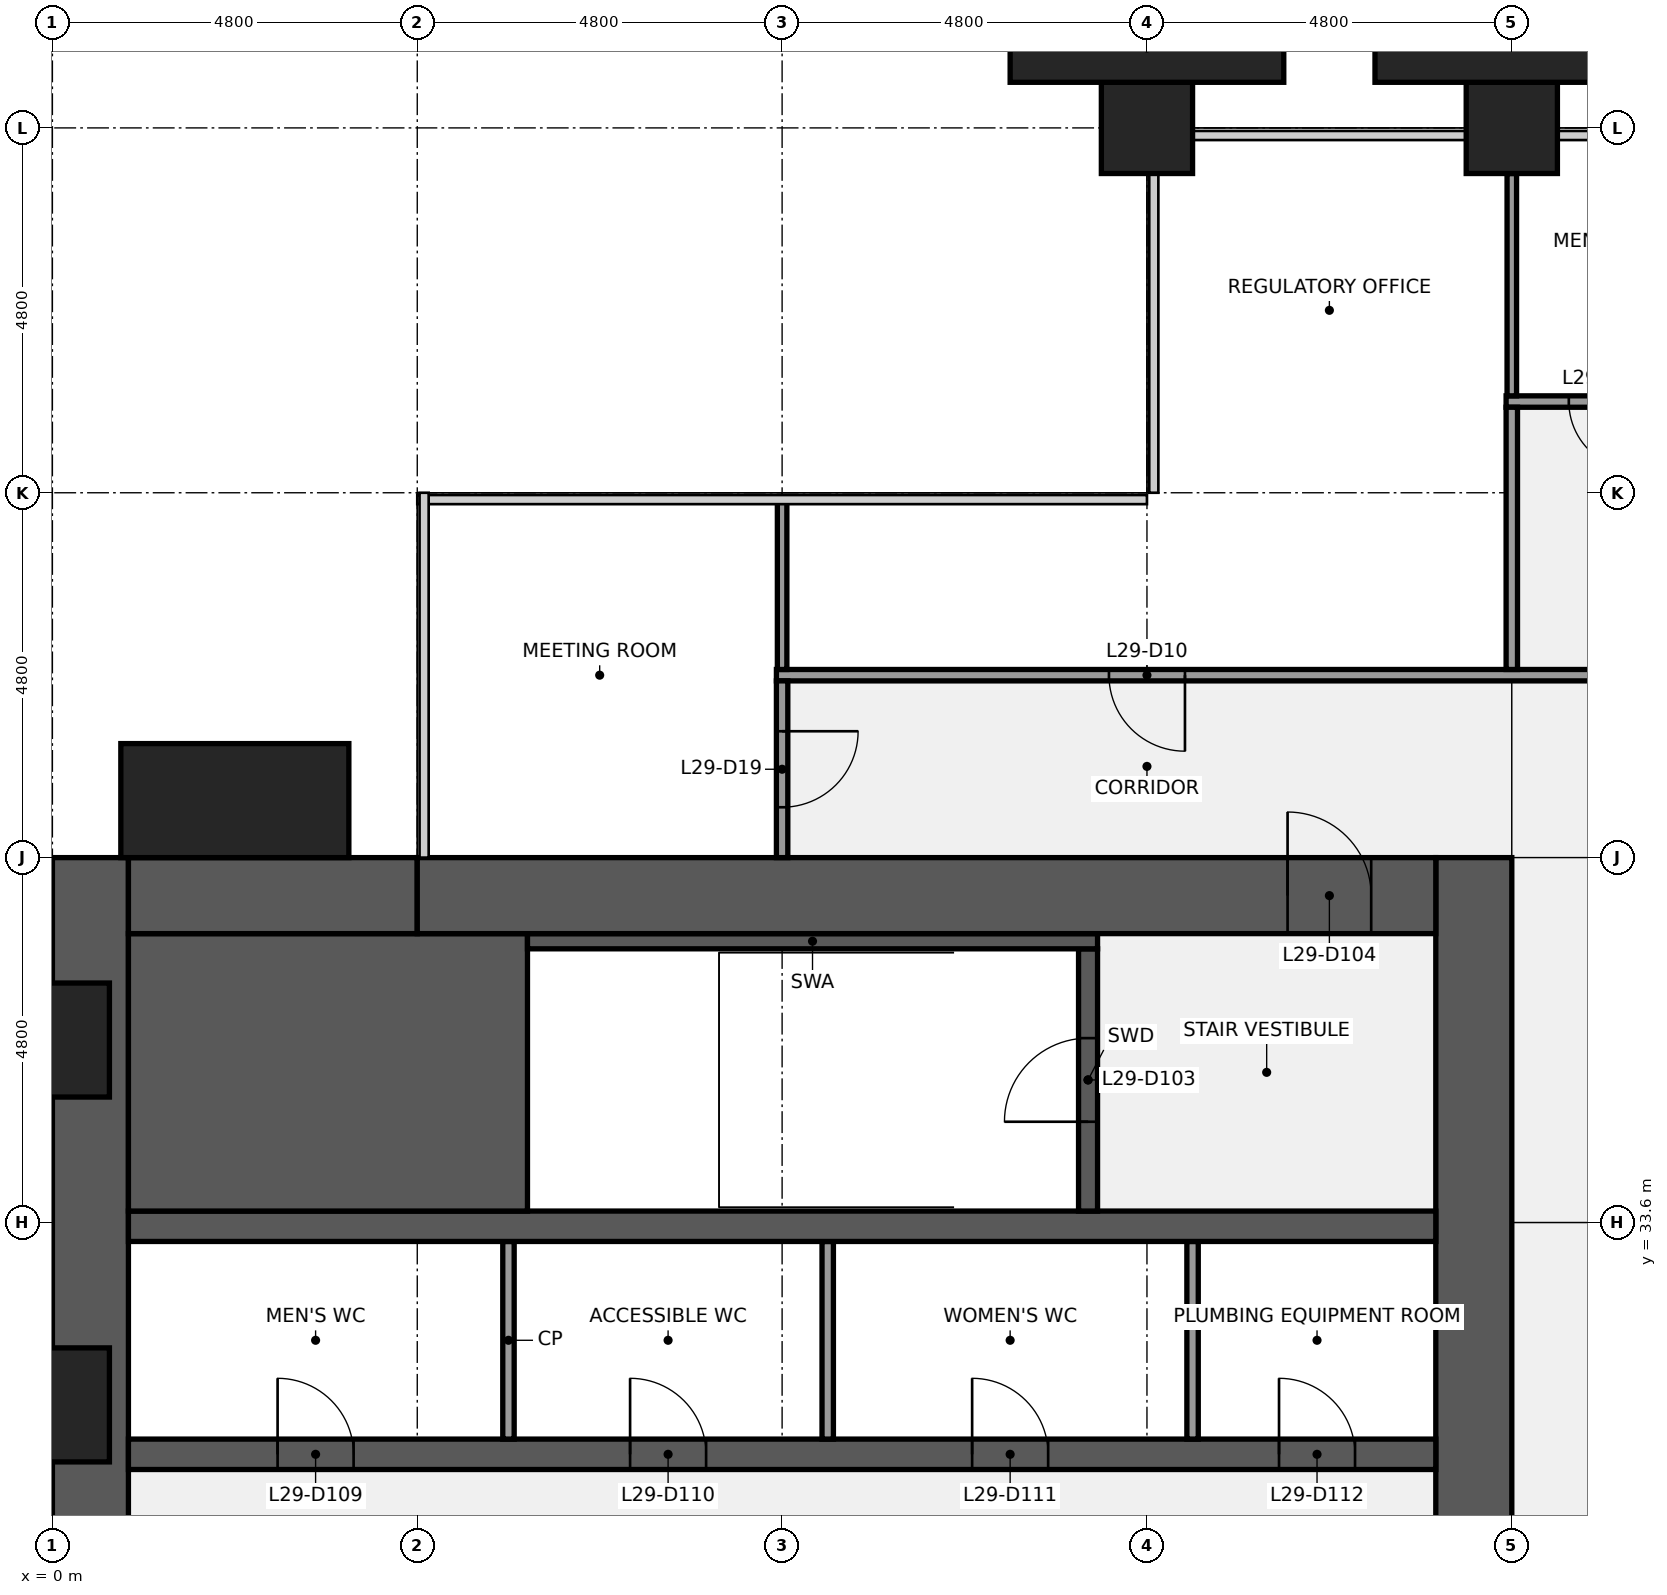
"""IFC4 building model, lengths in metres.
Left out: names, types, materials, properties, quantities, classifications, styles, units other than length and angle.
Written with IfcOpenShell. Run it as: python <this file> out.ifc"""

import sys

from ifc_helpers import new_model, si_unit, direction, frame, frame_2d, origin, origin_2d, place, context, subcontext, project, spatial, rectangle, extrude, element, fill, save


model = new_model("IFC4")
c1 = context("Model", 3, precision=1e-05, world=origin(), true_north=direction((0.0, 1.0)))
c2 = subcontext(c1, "Body", "Model", "MODEL_VIEW")
j1 = project(units=[si_unit("LENGTHUNIT", "METRE"), si_unit("PLANEANGLEUNIT", "RADIAN")], contexts=[c1])
p1 = place(None, origin())
s1 = spatial("IfcSite", under=j1, at=p1, CompositionType="ELEMENT")
p2 = place(p1, origin())
s2 = spatial("IfcBuilding", under=s1, at=p2, CompositionType="ELEMENT")
p3 = place(p2, frame((0.0, 0.0, 136.1)))
s3 = spatial("IfcBuildingStorey", under=s2, at=p3, CompositionType="ELEMENT", Elevation=136.1)
for number, where, z_axis, x_axis in (
    (1, (14.4, 48.0, 0.0), (0.0, 0.0, 1.0), (1.0, 0.0, 0.0)),
    (2, (19.2, 48.0, 0.0), (0.0, 0.0, 1.0), (1.0, 0.0, 0.0)),
):
    element("IfcColumn", number, at=place(p3, frame(where, z_axis=z_axis, x_axis=x_axis)), inside=s3, PredefinedType="COLUMN", context=c2, shape_type="SweptSolid", body=[
        extrude(rectangle(XDim=1.2, YDim=1.2, at=origin_2d()), origin(), (0.0, 0.0, 1.0), 4.0),
    ])
p4 = place(p3, frame((0.5, 9.6, 0.0), z_axis=(0.0, 0.0, 1.0), x_axis=(0.0, 1.0, 0.0)))
e3 = element("IfcWall", 3, at=p4, inside=s3, PredefinedType="SHEAR", context=c2, shape_type="SweptSolid", body=[
    extrude(rectangle(XDim=28.8, YDim=1.0, at=frame_2d((14.4, 0.0))), origin(), (0.0, 0.0, 1.0), 3.84),
])
p5 = place(p4, frame((8.85, 0.0, 0.9)))
e4 = element("IfcOpeningElement", 4, at=p5, cuts=e3, PredefinedType="OPENING", context=c2, shape_type="SweptSolid", body=[
    extrude(rectangle(XDim=1.5, YDim=1.5, at=frame_2d((0.75, 0.75))), frame((0.0, 0.51, 0.0), z_axis=(0.0, -1.0, 0.0), x_axis=(1.0, 0.0, 0.0)), (0.0, 0.0, 1.0), 1.02),
])
p6 = place(p4, frame((18.45, 0.0, 0.9)))
e5 = element("IfcOpeningElement", 5, at=p6, cuts=e3, PredefinedType="OPENING", context=c2, shape_type="SweptSolid", body=[
    extrude(rectangle(XDim=1.5, YDim=1.5, at=frame_2d((0.75, 0.75))), frame((0.0, 0.51, 0.0), z_axis=(0.0, -1.0, 0.0), x_axis=(1.0, 0.0, 0.0)), (0.0, 0.0, 1.0), 1.02),
])
p7 = place(p3, frame((18.7, 38.4, 0.0), z_axis=(0.0, 0.0, 1.0), x_axis=(0.0, -1.0, 0.0)))
e6 = element("IfcWall", 6, at=p7, inside=s3, PredefinedType="SHEAR", context=c2, shape_type="SweptSolid", body=[
    extrude(rectangle(XDim=28.8, YDim=1.0, at=frame_2d((14.4, 0.0))), origin(), (0.0, 0.0, 1.0), 3.84),
])
p8 = place(p7, frame((18.3, 0.0, 0.0)))
e7 = element("IfcOpeningElement", 7, at=p8, cuts=e6, PredefinedType="OPENING", context=c2, shape_type="SweptSolid", body=[
    extrude(rectangle(XDim=1.8, YDim=2.1, at=frame_2d((0.9, 1.05))), frame((0.0, 0.51, 0.0), z_axis=(0.0, -1.0, 0.0), x_axis=(1.0, 0.0, 0.0)), (0.0, 0.0, 1.0), 1.02),
])
p9 = place(p7, frame((8.7, 0.0, 0.0)))
e8 = element("IfcOpeningElement", 8, at=p9, cuts=e6, PredefinedType="OPENING", context=c2, shape_type="SweptSolid", body=[
    extrude(rectangle(XDim=1.8, YDim=2.1, at=frame_2d((0.9, 1.05))), frame((0.0, 0.51, 0.0), z_axis=(0.0, -1.0, 0.0), x_axis=(1.0, 0.0, 0.0)), (0.0, 0.0, 1.0), 1.02),
])
p10 = place(p3, frame((1.0, 30.55, 0.0), z_axis=(0.0, 0.0, 1.0), x_axis=(1.0, 0.0, 0.0)))
e9 = element("IfcWall", 9, at=p10, inside=s3, PredefinedType="SHEAR", context=c2, shape_type="SweptSolid", body=[
    extrude(rectangle(XDim=17.2, YDim=0.4, at=frame_2d((8.6, 0.0))), origin(), (0.0, 0.0, 1.0), 3.84),
])
p11 = place(p10, frame((1.962, 0.0, 0.0)))
e10 = element("IfcOpeningElement", 10, at=p11, cuts=e9, PredefinedType="OPENING", context=c2, shape_type="SweptSolid", body=[
    extrude(rectangle(XDim=1.0, YDim=2.1, at=frame_2d((0.5, 1.05))), frame((0.0, 0.21, 0.0), z_axis=(0.0, -1.0, 0.0), x_axis=(1.0, 0.0, 0.0)), (0.0, 0.0, 1.0), 0.42),
])
p12 = place(p10, frame((6.6, 0.0, 0.0)))
e11 = element("IfcOpeningElement", 11, at=p12, cuts=e9, PredefinedType="OPENING", context=c2, shape_type="SweptSolid", body=[
    extrude(rectangle(XDim=1.0, YDim=2.1, at=frame_2d((0.5, 1.05))), frame((0.0, 0.21, 0.0), z_axis=(0.0, -1.0, 0.0), x_axis=(1.0, 0.0, 0.0)), (0.0, 0.0, 1.0), 0.42),
])
p13 = place(p10, frame((11.1, 0.0, 0.0)))
e12 = element("IfcOpeningElement", 12, at=p13, cuts=e9, PredefinedType="OPENING", context=c2, shape_type="SweptSolid", body=[
    extrude(rectangle(XDim=1.0, YDim=2.1, at=frame_2d((0.5, 1.05))), frame((0.0, 0.21, 0.0), z_axis=(0.0, -1.0, 0.0), x_axis=(1.0, 0.0, 0.0)), (0.0, 0.0, 1.0), 0.42),
])
p14 = place(p10, frame((15.137, 0.0, 0.0)))
e13 = element("IfcOpeningElement", 13, at=p14, cuts=e9, PredefinedType="OPENING", context=c2, shape_type="SweptSolid", body=[
    extrude(rectangle(XDim=1.0, YDim=2.1, at=frame_2d((0.5, 1.05))), frame((0.0, 0.21, 0.0), z_axis=(0.0, -1.0, 0.0), x_axis=(1.0, 0.0, 0.0)), (0.0, 0.0, 1.0), 0.42),
])
for number, where, z_axis, x_axis in (
    (14, (6.0, 30.75, 0.0), (0.0, 0.0, 1.0), (0.0, 1.0, 0.0)),
    (15, (10.2, 30.75, 0.0), (0.0, 0.0, 1.0), (0.0, 1.0, 0.0)),
    (16, (15.0, 30.75, 0.0), (0.0, 0.0, 1.0), (0.0, 1.0, 0.0)),
):
    element("IfcWall", number, at=place(p3, frame(where, z_axis=z_axis, x_axis=x_axis)), inside=s3, PredefinedType="PARTITIONING", context=c2, shape_type="SweptSolid", body=[
        extrude(rectangle(XDim=2.6, YDim=0.15, at=frame_2d((1.3, 0.0))), origin(), (0.0, 0.0, 1.0), 3.84),
    ])
p15 = place(p3, frame((1.0, 33.55, 0.0), z_axis=(0.0, 0.0, 1.0), x_axis=(1.0, 0.0, 0.0)))
e17 = element("IfcWall", 17, at=p15, inside=s3, PredefinedType="SHEAR", context=c2, shape_type="SweptSolid", body=[
    extrude(rectangle(XDim=17.2, YDim=0.4, at=frame_2d((8.6, 0.0))), origin(), (0.0, 0.0, 1.0), 3.84),
])
p16 = place(p3, frame((1.0, 35.575, 0.0), z_axis=(0.0, 0.0, 1.0), x_axis=(1.0, 0.0, 0.0)))
e18 = element("IfcWall", 18, at=p16, inside=s3, PredefinedType="SHEAR", context=c2, shape_type="SweptSolid", body=[
    extrude(rectangle(XDim=5.25, YDim=3.65, at=frame_2d((2.625, 0.0))), origin(), (0.0, 0.0, 1.0), 3.84),
])
p17 = place(p3, frame((13.625, 33.75, 0.0), z_axis=(0.0, 0.0, 1.0), x_axis=(0.0, 1.0, 0.0)))
e19 = element("IfcWall", 19, at=p17, inside=s3, PredefinedType="SHEAR", context=c2, shape_type="SweptSolid", body=[
    extrude(rectangle(XDim=3.45, YDim=0.25, at=frame_2d((1.725, 0.0))), origin(), (0.0, 0.0, 1.0), 3.84),
])
p18 = place(p17, frame((1.175, 0.0, 0.0)))
e20 = element("IfcOpeningElement", 20, at=p18, cuts=e19, PredefinedType="OPENING", context=c2, shape_type="SweptSolid", body=[
    extrude(rectangle(XDim=1.1, YDim=2.1, at=frame_2d((0.55, 1.05))), frame((0.0, 0.135, 0.0), z_axis=(0.0, -1.0, 0.0), x_axis=(1.0, 0.0, 0.0)), (0.0, 0.0, 1.0), 0.27),
])
p19 = place(p3, frame((6.25, 37.3, 0.0), z_axis=(0.0, 0.0, 1.0), x_axis=(1.0, 0.0, 0.0)))
e21 = element("IfcWall", 21, at=p19, inside=s3, PredefinedType="SHEAR", context=c2, shape_type="SweptSolid", body=[
    extrude(rectangle(XDim=7.5, YDim=0.2, at=frame_2d((3.75, 0.0))), origin(), (0.0, 0.0, 1.0), 3.84),
])
p20 = place(p3, frame((1.0, 37.9, 0.0), z_axis=(0.0, 0.0, 1.0), x_axis=(1.0, 0.0, 0.0)))
e22 = element("IfcWall", 22, at=p20, inside=s3, PredefinedType="SHEAR", context=c2, shape_type="SweptSolid", body=[
    extrude(rectangle(XDim=3.8, YDim=1.0, at=frame_2d((1.9, 0.0))), origin(), (0.0, 0.0, 1.0), 3.84),
])
p21 = place(p3, frame((4.8, 37.9, 0.0), z_axis=(0.0, 0.0, 1.0), x_axis=(1.0, 0.0, 0.0)))
e23 = element("IfcWall", 23, at=p21, inside=s3, PredefinedType="SHEAR", context=c2, shape_type="SweptSolid", body=[
    extrude(rectangle(XDim=13.4, YDim=1.0, at=frame_2d((6.7, 0.0))), origin(), (0.0, 0.0, 1.0), 3.84),
])
p22 = place(p21, frame((11.45, 0.0, 0.0)))
e24 = element("IfcOpeningElement", 24, at=p22, cuts=e23, PredefinedType="OPENING", context=c2, shape_type="SweptSolid", body=[
    extrude(rectangle(XDim=1.1, YDim=2.1, at=frame_2d((0.55, 1.05))), frame((0.0, 0.51, 0.0), z_axis=(0.0, -1.0, 0.0), x_axis=(1.0, 0.0, 0.0)), (0.0, 0.0, 1.0), 1.02),
])
p23 = place(p3, frame((9.525, 40.8, 0.0), z_axis=(0.0, 0.0, 1.0), x_axis=(1.0, 0.0, 0.0)))
e25 = element("IfcWall", 25, at=p23, inside=s3, PredefinedType="PARTITIONING", context=c2, shape_type="SweptSolid", body=[
    extrude(rectangle(XDim=38.55, YDim=0.15, at=frame_2d((19.275, 0.0))), origin(), (0.0, 0.0, 1.0), 2.849),
])
p24 = place(p23, frame((4.375, 0.0, 0.0)))
e26 = element("IfcOpeningElement", 26, at=p24, cuts=e25, PredefinedType="OPENING", context=c2, shape_type="SweptSolid", body=[
    extrude(rectangle(XDim=1.0, YDim=2.1, at=frame_2d((0.5, 1.05))), frame((0.0, 0.085, 0.0), z_axis=(0.0, -1.0, 0.0), x_axis=(1.0, 0.0, 0.0)), (0.0, 0.0, 1.0), 0.17),
])
p25 = place(p23, frame((12.775, 0.0, 0.0)))
e27 = element("IfcOpeningElement", 27, at=p25, cuts=e25, PredefinedType="OPENING", context=c2, shape_type="SweptSolid", body=[
    extrude(rectangle(XDim=1.0, YDim=2.1, at=frame_2d((0.5, 1.05))), frame((0.0, 0.085, 0.0), z_axis=(0.0, -1.0, 0.0), x_axis=(1.0, 0.0, 0.0)), (0.0, 0.0, 1.0), 0.17),
])
p26 = place(p23, frame((17.575, 0.0, 0.0)))
e28 = element("IfcOpeningElement", 28, at=p26, cuts=e25, PredefinedType="OPENING", context=c2, shape_type="SweptSolid", body=[
    extrude(rectangle(XDim=1.0, YDim=2.1, at=frame_2d((0.5, 1.05))), frame((0.0, 0.085, 0.0), z_axis=(0.0, -1.0, 0.0), x_axis=(1.0, 0.0, 0.0)), (0.0, 0.0, 1.0), 0.17),
])
p27 = place(p23, frame((21.175, 0.0, 0.0)))
e29 = element("IfcOpeningElement", 29, at=p27, cuts=e25, PredefinedType="OPENING", context=c2, shape_type="SweptSolid", body=[
    extrude(rectangle(XDim=1.0, YDim=2.1, at=frame_2d((0.5, 1.05))), frame((0.0, 0.085, 0.0), z_axis=(0.0, -1.0, 0.0), x_axis=(1.0, 0.0, 0.0)), (0.0, 0.0, 1.0), 0.17),
])
p28 = place(p23, frame((25.975, 0.0, 0.0)))
e30 = element("IfcOpeningElement", 30, at=p28, cuts=e25, PredefinedType="OPENING", context=c2, shape_type="SweptSolid", body=[
    extrude(rectangle(XDim=1.0, YDim=2.1, at=frame_2d((0.5, 1.05))), frame((0.0, 0.085, 0.0), z_axis=(0.0, -1.0, 0.0), x_axis=(1.0, 0.0, 0.0)), (0.0, 0.0, 1.0), 0.17),
])
p29 = place(p23, frame((33.175, 0.0, 0.0)))
e31 = element("IfcOpeningElement", 31, at=p29, cuts=e25, PredefinedType="OPENING", context=c2, shape_type="SweptSolid", body=[
    extrude(rectangle(XDim=1.0, YDim=2.1, at=frame_2d((0.5, 1.05))), frame((0.0, 0.085, 0.0), z_axis=(0.0, -1.0, 0.0), x_axis=(1.0, 0.0, 0.0)), (0.0, 0.0, 1.0), 0.17),
])
p30 = place(p3, frame((19.125, 44.4, 0.0), z_axis=(0.0, 0.0, 1.0), x_axis=(1.0, 0.0, 0.0)))
e32 = element("IfcWall", 32, at=p30, inside=s3, PredefinedType="PARTITIONING", context=c2, shape_type="SweptSolid", body=[
    extrude(rectangle(XDim=7.35, YDim=0.15, at=frame_2d((3.675, 0.0))), origin(), (0.0, 0.0, 1.0), 2.849),
])
p31 = place(p30, frame((0.825, 0.0, 0.0)))
e33 = element("IfcOpeningElement", 33, at=p31, cuts=e32, PredefinedType="OPENING", context=c2, shape_type="SweptSolid", body=[
    extrude(rectangle(XDim=0.9, YDim=2.1, at=frame_2d((0.45, 1.05))), frame((0.0, 0.085, 0.0), z_axis=(0.0, -1.0, 0.0), x_axis=(1.0, 0.0, 0.0)), (0.0, 0.0, 1.0), 0.17),
])
p32 = place(p30, frame((3.225, 0.0, 0.0)))
e34 = element("IfcOpeningElement", 34, at=p32, cuts=e32, PredefinedType="OPENING", context=c2, shape_type="SweptSolid", body=[
    extrude(rectangle(XDim=0.9, YDim=2.1, at=frame_2d((0.45, 1.05))), frame((0.0, 0.085, 0.0), z_axis=(0.0, -1.0, 0.0), x_axis=(1.0, 0.0, 0.0)), (0.0, 0.0, 1.0), 0.17),
])
p33 = place(p30, frame((5.475, 0.0, 0.0)))
e35 = element("IfcOpeningElement", 35, at=p33, cuts=e32, PredefinedType="OPENING", context=c2, shape_type="SweptSolid", body=[
    extrude(rectangle(XDim=1.2, YDim=2.1, at=frame_2d((0.6, 1.05))), frame((0.0, 0.085, 0.0), z_axis=(0.0, -1.0, 0.0), x_axis=(1.0, 0.0, 0.0)), (0.0, 0.0, 1.0), 0.17),
])
p34 = place(p3, frame((9.6, 40.875, 0.0), z_axis=(0.0, 0.0, 1.0), x_axis=(0.0, 1.0, 0.0)))
e36 = element("IfcWall", 36, at=p34, inside=s3, PredefinedType="PARTITIONING", context=c2, shape_type="SweptSolid", body=[
    extrude(rectangle(XDim=2.225, YDim=0.125, at=frame_2d((1.113, 0.0))), origin(), (0.0, 0.0, 1.0), 2.849),
])
p35 = place(p3, frame((9.6, 38.4, 0.0), z_axis=(0.0, 0.0, 1.0), x_axis=(0.0, 1.0, 0.0)))
e37 = element("IfcWall", 37, at=p35, inside=s3, PredefinedType="PARTITIONING", context=c2, shape_type="SweptSolid", body=[
    extrude(rectangle(XDim=2.325, YDim=0.15, at=frame_2d((1.163, 0.0))), origin(), (0.0, 0.0, 1.0), 2.849),
])
p36 = place(p35, frame((0.663, 0.0, 0.0)))
e38 = element("IfcOpeningElement", 38, at=p36, cuts=e37, PredefinedType="OPENING", context=c2, shape_type="SweptSolid", body=[
    extrude(rectangle(XDim=1.0, YDim=2.1, at=frame_2d((0.5, 1.05))), frame((0.0, 0.085, 0.0), z_axis=(0.0, -1.0, 0.0), x_axis=(1.0, 0.0, 0.0)), (0.0, 0.0, 1.0), 0.17),
])
p37 = place(p3, frame((19.2, 44.475, 0.0), z_axis=(0.0, 0.0, 1.0), x_axis=(0.0, 1.0, 0.0)))
e39 = element("IfcWall", 39, at=p37, inside=s3, PredefinedType="PARTITIONING", context=c2, shape_type="SweptSolid", body=[
    extrude(rectangle(XDim=2.925, YDim=0.125, at=frame_2d((1.462, 0.0))), origin(), (0.0, 0.0, 1.0), 2.849),
])
p38 = place(p3, frame((19.2, 40.875, 0.0), z_axis=(0.0, 0.0, 1.0), x_axis=(0.0, 1.0, 0.0)))
e40 = element("IfcWall", 40, at=p38, inside=s3, PredefinedType="PARTITIONING", context=c2, shape_type="SweptSolid", body=[
    extrude(rectangle(XDim=3.45, YDim=0.15, at=frame_2d((1.725, 0.0))), origin(), (0.0, 0.0, 1.0), 2.849),
])
p39 = place(p3, frame((2.4, 39.15, 0.0), z_axis=(0.0, 0.0, 1.0), x_axis=(1.0, 0.0, 0.0)))
e41 = element("IfcColumn", 41, at=p39, inside=s3, PredefinedType="PILASTER", context=c2, shape_type="SweptSolid", body=[
    extrude(rectangle(XDim=3.0, YDim=1.5, at=origin_2d()), origin(), (0.0, 0.0, 1.0), 4.0),
])
for number, where, z_axis, x_axis in (
    (42, (14.4, 49.05, 0.0), (0.0, 0.0, 1.0), (1.0, 0.0, 0.0)),
    (43, (19.2, 49.05, 0.0), (0.0, 0.0, 1.0), (1.0, 0.0, 0.0)),
):
    element("IfcColumn", number, at=place(p3, frame(where, z_axis=z_axis, x_axis=x_axis)), inside=s3, PredefinedType="PILASTER", context=c2, shape_type="SweptSolid", body=[
        extrude(rectangle(XDim=3.6, YDim=0.9, at=origin_2d()), origin(), (0.0, 0.0, 1.0), 4.0),
    ])
p40 = place(p18, origin())
e44 = element("IfcDoor", 44, at=p40, inside=s3, OperationType="SINGLE_SWING_LEFT", PredefinedType="DOOR", context=c2, shape_type="SweptSolid", body=[
    extrude(rectangle(XDim=1.1, YDim=2.1, at=frame_2d((0.55, 1.05))), frame((0.0, 0.025, 0.0), z_axis=(0.0, -1.0, 0.0), x_axis=(1.0, 0.0, 0.0)), (0.0, 0.0, 1.0), 0.05),
])
fill(e20, e44)
p41 = place(p22, origin())
e45 = element("IfcDoor", 45, at=p41, inside=s3, OperationType="SINGLE_SWING_LEFT", PredefinedType="DOOR", context=c2, shape_type="SweptSolid", body=[
    extrude(rectangle(XDim=1.1, YDim=2.1, at=frame_2d((0.55, 1.05))), frame((0.0, 0.025, 0.0), z_axis=(0.0, -1.0, 0.0), x_axis=(1.0, 0.0, 0.0)), (0.0, 0.0, 1.0), 0.05),
])
fill(e24, e45)
p42 = place(p11, origin())
e46 = element("IfcDoor", 46, at=p42, inside=s3, OperationType="SINGLE_SWING_LEFT", PredefinedType="DOOR", context=c2, shape_type="SweptSolid", body=[
    extrude(rectangle(XDim=1.0, YDim=2.1, at=frame_2d((0.5, 1.05))), frame((0.0, 0.025, 0.0), z_axis=(0.0, -1.0, 0.0), x_axis=(1.0, 0.0, 0.0)), (0.0, 0.0, 1.0), 0.05),
])
fill(e10, e46)
p43 = place(p12, origin())
e47 = element("IfcDoor", 47, at=p43, inside=s3, OperationType="SINGLE_SWING_LEFT", PredefinedType="DOOR", context=c2, shape_type="SweptSolid", body=[
    extrude(rectangle(XDim=1.0, YDim=2.1, at=frame_2d((0.5, 1.05))), frame((0.0, 0.025, 0.0), z_axis=(0.0, -1.0, 0.0), x_axis=(1.0, 0.0, 0.0)), (0.0, 0.0, 1.0), 0.05),
])
fill(e11, e47)
p44 = place(p13, origin())
e48 = element("IfcDoor", 48, at=p44, inside=s3, OperationType="SINGLE_SWING_LEFT", PredefinedType="DOOR", context=c2, shape_type="SweptSolid", body=[
    extrude(rectangle(XDim=1.0, YDim=2.1, at=frame_2d((0.5, 1.05))), frame((0.0, 0.025, 0.0), z_axis=(0.0, -1.0, 0.0), x_axis=(1.0, 0.0, 0.0)), (0.0, 0.0, 1.0), 0.05),
])
fill(e12, e48)
p45 = place(p14, origin())
e49 = element("IfcDoor", 49, at=p45, inside=s3, OperationType="SINGLE_SWING_LEFT", PredefinedType="DOOR", context=c2, shape_type="SweptSolid", body=[
    extrude(rectangle(XDim=1.0, YDim=2.1, at=frame_2d((0.5, 1.05))), frame((0.0, 0.025, 0.0), z_axis=(0.0, -1.0, 0.0), x_axis=(1.0, 0.0, 0.0)), (0.0, 0.0, 1.0), 0.05),
])
fill(e13, e49)
p46 = place(p24, origin())
e50 = element("IfcDoor", 50, at=p46, inside=s3, OperationType="SINGLE_SWING_RIGHT", PredefinedType="DOOR", context=c2, shape_type="SweptSolid", body=[
    extrude(rectangle(XDim=1.0, YDim=2.1, at=frame_2d((0.5, 1.05))), frame((0.0, 0.025, 0.0), z_axis=(0.0, -1.0, 0.0), x_axis=(1.0, 0.0, 0.0)), (0.0, 0.0, 1.0), 0.05),
])
fill(e26, e50)
p47 = place(p31, origin())
e51 = element("IfcDoor", 51, at=p47, inside=s3, OperationType="SINGLE_SWING_RIGHT", PredefinedType="DOOR", context=c2, shape_type="SweptSolid", body=[
    extrude(rectangle(XDim=0.9, YDim=2.1, at=frame_2d((0.45, 1.05))), frame((0.0, 0.025, 0.0), z_axis=(0.0, -1.0, 0.0), x_axis=(1.0, 0.0, 0.0)), (0.0, 0.0, 1.0), 0.05),
])
fill(e33, e51)
p48 = place(p36, origin())
e52 = element("IfcDoor", 52, at=p48, inside=s3, OperationType="SINGLE_SWING_RIGHT", PredefinedType="DOOR", context=c2, shape_type="SweptSolid", body=[
    extrude(rectangle(XDim=1.0, YDim=2.1, at=frame_2d((0.5, 1.05))), frame((0.0, 0.025, 0.0), z_axis=(0.0, -1.0, 0.0), x_axis=(1.0, 0.0, 0.0)), (0.0, 0.0, 1.0), 0.05),
])
fill(e38, e52)
save(model, sys.argv[1])
